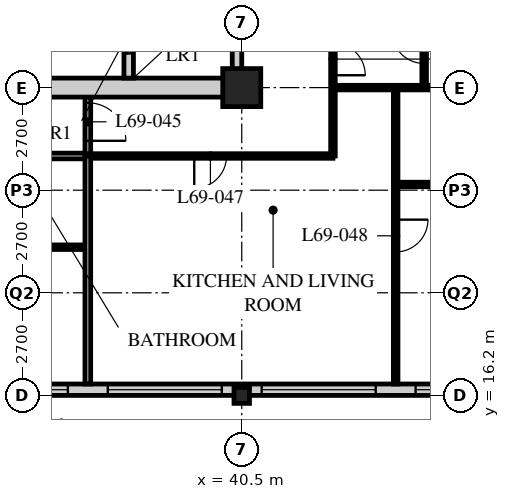
"""IFC4 building model, lengths in metres.
Left out: names, types, materials, properties, quantities, classifications, styles, units other than length and angle.
Written with IfcOpenShell. Run it as: python <this file> out.ifc"""

import sys

from ifc_helpers import new_model, si_unit, direction, frame, frame_2d, origin, origin_2d, place, context, subcontext, project, spatial, rectangle, hollow_rectangle, i_section, extrude, element, fill, save


model = new_model("IFC4")
c1 = context("Model", 3, precision=1e-05, world=origin(), true_north=direction((0.0, 1.0)))
c2 = subcontext(c1, "Body", "Model", "MODEL_VIEW")
j1 = project(units=[si_unit("LENGTHUNIT", "METRE"), si_unit("PLANEANGLEUNIT", "RADIAN")], contexts=[c1])
p1 = place(None, origin())
s1 = spatial("IfcSite", under=j1, at=p1, CompositionType="ELEMENT")
p2 = place(p1, origin())
s2 = spatial("IfcBuilding", under=s1, at=p2, CompositionType="ELEMENT")
p3 = place(p2, frame((0.0, 0.0, 269.7)))
s3 = spatial("IfcBuildingStorey", under=s2, at=p3, CompositionType="ELEMENT", Elevation=269.7)
p4 = place(p3, frame((40.5, 16.2, 0.0), z_axis=(0.0, 0.0, 1.0), x_axis=(1.0, 0.0, 0.0)))
e1 = element("IfcColumn", 1, at=p4, inside=s3, PredefinedType="COLUMN", context=c2, shape_type="SweptSolid", body=[
    extrude(i_section(OverallWidth=0.407, OverallDepth=0.419, WebThickness=0.031, FlangeThickness=0.049, FilletRadius=0.015, at=origin_2d()), origin(), (0.0, 0.0, 1.0), 3.9),
])
p5 = place(p3, frame((40.5, 24.3, 0.0), z_axis=(0.0, 0.0, 1.0), x_axis=(1.0, 0.0, 0.0)))
e2 = element("IfcColumn", 2, at=p5, inside=s3, PredefinedType="COLUMN", context=c2, shape_type="SweptSolid", body=[
    extrude(hollow_rectangle(XDim=1.0, YDim=1.0, WallThickness=0.1, at=origin_2d()), origin(), (0.0, 0.0, 1.0), 3.9),
])
p6 = place(p3, frame((8.4, 16.35, 0.0), z_axis=(0.0, 0.0, 1.0), x_axis=(1.0, 0.0, 0.0)))
e3 = element("IfcWall", 3, at=p6, inside=s3, PredefinedType="SOLIDWALL", context=c2, shape_type="SweptSolid", body=[
    extrude(rectangle(XDim=40.2, YDim=0.3, at=frame_2d((20.1, 0.0))), origin(), (0.0, 0.0, 1.0), 3.69),
])
p7 = place(p6, frame((0.225, 0.0, 0.6)))
e4 = element("IfcOpeningElement", 4, at=p7, cuts=e3, PredefinedType="OPENING", context=c2, shape_type="SweptSolid", body=[
    extrude(rectangle(XDim=3.0, YDim=2.4, at=frame_2d((1.5, 1.2))), frame((0.0, 0.16, 0.0), z_axis=(0.0, -1.0, 0.0), x_axis=(1.0, 0.0, 0.0)), (0.0, 0.0, 1.0), 0.32),
])
p8 = place(p6, frame((4.275, 0.0, 0.6)))
e5 = element("IfcOpeningElement", 5, at=p8, cuts=e3, PredefinedType="OPENING", context=c2, shape_type="SweptSolid", body=[
    extrude(rectangle(XDim=3.0, YDim=2.4, at=frame_2d((1.5, 1.2))), frame((0.0, 0.16, 0.0), z_axis=(0.0, -1.0, 0.0), x_axis=(1.0, 0.0, 0.0)), (0.0, 0.0, 1.0), 0.32),
])
p9 = place(p6, frame((8.325, 0.0, 0.6)))
e6 = element("IfcOpeningElement", 6, at=p9, cuts=e3, PredefinedType="OPENING", context=c2, shape_type="SweptSolid", body=[
    extrude(rectangle(XDim=3.0, YDim=2.4, at=frame_2d((1.5, 1.2))), frame((0.0, 0.16, 0.0), z_axis=(0.0, -1.0, 0.0), x_axis=(1.0, 0.0, 0.0)), (0.0, 0.0, 1.0), 0.32),
])
p10 = place(p6, frame((12.375, 0.0, 0.6)))
e7 = element("IfcOpeningElement", 7, at=p10, cuts=e3, PredefinedType="OPENING", context=c2, shape_type="SweptSolid", body=[
    extrude(rectangle(XDim=3.0, YDim=2.4, at=frame_2d((1.5, 1.2))), frame((0.0, 0.16, 0.0), z_axis=(0.0, -1.0, 0.0), x_axis=(1.0, 0.0, 0.0)), (0.0, 0.0, 1.0), 0.32),
])
p11 = place(p6, frame((16.425, 0.0, 0.6)))
e8 = element("IfcOpeningElement", 8, at=p11, cuts=e3, PredefinedType="OPENING", context=c2, shape_type="SweptSolid", body=[
    extrude(rectangle(XDim=3.0, YDim=2.4, at=frame_2d((1.5, 1.2))), frame((0.0, 0.16, 0.0), z_axis=(0.0, -1.0, 0.0), x_axis=(1.0, 0.0, 0.0)), (0.0, 0.0, 1.0), 0.32),
])
p12 = place(p6, frame((20.475, 0.0, 0.6)))
e9 = element("IfcOpeningElement", 9, at=p12, cuts=e3, PredefinedType="OPENING", context=c2, shape_type="SweptSolid", body=[
    extrude(rectangle(XDim=3.0, YDim=2.4, at=frame_2d((1.5, 1.2))), frame((0.0, 0.16, 0.0), z_axis=(0.0, -1.0, 0.0), x_axis=(1.0, 0.0, 0.0)), (0.0, 0.0, 1.0), 0.32),
])
p13 = place(p6, frame((24.525, 0.0, 0.6)))
e10 = element("IfcOpeningElement", 10, at=p13, cuts=e3, PredefinedType="OPENING", context=c2, shape_type="SweptSolid", body=[
    extrude(rectangle(XDim=3.0, YDim=2.4, at=frame_2d((1.5, 1.2))), frame((0.0, 0.16, 0.0), z_axis=(0.0, -1.0, 0.0), x_axis=(1.0, 0.0, 0.0)), (0.0, 0.0, 1.0), 0.32),
])
p14 = place(p6, frame((28.575, 0.0, 0.6)))
e11 = element("IfcOpeningElement", 11, at=p14, cuts=e3, PredefinedType="OPENING", context=c2, shape_type="SweptSolid", body=[
    extrude(rectangle(XDim=3.0, YDim=2.4, at=frame_2d((1.5, 1.2))), frame((0.0, 0.16, 0.0), z_axis=(0.0, -1.0, 0.0), x_axis=(1.0, 0.0, 0.0)), (0.0, 0.0, 1.0), 0.32),
])
p15 = place(p6, frame((32.625, 0.0, 0.6)))
e12 = element("IfcOpeningElement", 12, at=p15, cuts=e3, PredefinedType="OPENING", context=c2, shape_type="SweptSolid", body=[
    extrude(rectangle(XDim=3.0, YDim=2.4, at=frame_2d((1.5, 1.2))), frame((0.0, 0.16, 0.0), z_axis=(0.0, -1.0, 0.0), x_axis=(1.0, 0.0, 0.0)), (0.0, 0.0, 1.0), 0.32),
])
p16 = place(p6, frame((36.675, 0.0, 0.6)))
e13 = element("IfcOpeningElement", 13, at=p16, cuts=e3, PredefinedType="OPENING", context=c2, shape_type="SweptSolid", body=[
    extrude(rectangle(XDim=3.0, YDim=2.4, at=frame_2d((1.5, 1.2))), frame((0.0, 0.16, 0.0), z_axis=(0.0, -1.0, 0.0), x_axis=(1.0, 0.0, 0.0)), (0.0, 0.0, 1.0), 0.32),
])
p17 = place(p3, frame((12.15, 22.5, 0.0), z_axis=(0.0, 0.0, 1.0), x_axis=(1.0, 0.0, 0.0)))
e14 = element("IfcWall", 14, at=p17, inside=s3, PredefinedType="PARTITIONING", context=c2, shape_type="SweptSolid", body=[
    extrude(rectangle(XDim=24.3, YDim=0.15, at=frame_2d((12.15, 0.0))), origin(), (0.0, 0.0, 1.0), 3.69),
])
p18 = place(p17, frame((4.45, 0.0, 0.0)))
e15 = element("IfcOpeningElement", 15, at=p18, cuts=e14, PredefinedType="OPENING", context=c2, shape_type="SweptSolid", body=[
    extrude(rectangle(XDim=1.0, YDim=2.1, at=frame_2d((0.5, 1.05))), frame((0.0, 0.085, 0.0), z_axis=(0.0, -1.0, 0.0), x_axis=(1.0, 0.0, 0.0)), (0.0, 0.0, 1.0), 0.17),
])
p19 = place(p17, frame((12.55, 0.0, 0.0)))
e16 = element("IfcOpeningElement", 16, at=p19, cuts=e14, PredefinedType="OPENING", context=c2, shape_type="SweptSolid", body=[
    extrude(rectangle(XDim=1.0, YDim=2.1, at=frame_2d((0.5, 1.05))), frame((0.0, 0.085, 0.0), z_axis=(0.0, -1.0, 0.0), x_axis=(1.0, 0.0, 0.0)), (0.0, 0.0, 1.0), 0.17),
])
p20 = place(p17, frame((2.625, 0.0, 0.0)))
e17 = element("IfcOpeningElement", 17, at=p20, cuts=e14, PredefinedType="OPENING", context=c2, shape_type="SweptSolid", body=[
    extrude(rectangle(XDim=1.0, YDim=2.1, at=frame_2d((0.5, 1.05))), frame((0.0, 0.085, 0.0), z_axis=(0.0, -1.0, 0.0), x_axis=(1.0, 0.0, 0.0)), (0.0, 0.0, 1.0), 0.17),
])
p21 = place(p3, frame((36.45, 22.5, 0.0), z_axis=(0.0, 0.0, 1.0), x_axis=(0.0, 1.0, 0.0)))
e18 = element("IfcWall", 18, at=p21, inside=s3, PredefinedType="PARTITIONING", context=c2, shape_type="SweptSolid", body=[
    extrude(rectangle(XDim=1.8, YDim=0.15, at=frame_2d((0.9, 0.0))), origin(), (0.0, 0.0, 1.0), 3.69),
])
p22 = place(p21, frame((0.4, 0.0, 0.0)))
e19 = element("IfcOpeningElement", 19, at=p22, cuts=e18, PredefinedType="OPENING", context=c2, shape_type="SweptSolid", body=[
    extrude(rectangle(XDim=1.0, YDim=2.1, at=frame_2d((0.5, 1.05))), frame((0.0, 0.085, 0.0), z_axis=(0.0, -1.0, 0.0), x_axis=(1.0, 0.0, 0.0)), (0.0, 0.0, 1.0), 0.17),
])
p23 = place(p3, frame((12.15, 20.1, 0.0), z_axis=(0.0, 0.0, 1.0), x_axis=(1.0, 0.0, 0.0)))
e20 = element("IfcWall", 20, at=p23, inside=s3, PredefinedType="PARTITIONING", context=c2, shape_type="SweptSolid", body=[
    extrude(rectangle(XDim=24.3, YDim=0.12, at=frame_2d((12.15, 0.0))), origin(), (0.0, 0.0, 1.0), 3.69),
])
p24 = place(p23, frame((5.025, 0.0, 0.0)))
e21 = element("IfcOpeningElement", 21, at=p24, cuts=e20, PredefinedType="OPENING", context=c2, shape_type="SweptSolid", body=[
    extrude(rectangle(XDim=0.85, YDim=2.1, at=frame_2d((0.425, 1.05))), frame((0.0, 0.07, 0.0), z_axis=(0.0, -1.0, 0.0), x_axis=(1.0, 0.0, 0.0)), (0.0, 0.0, 1.0), 0.14),
])
p25 = place(p23, frame((8.425, 0.0, 0.0)))
e22 = element("IfcOpeningElement", 22, at=p25, cuts=e20, PredefinedType="OPENING", context=c2, shape_type="SweptSolid", body=[
    extrude(rectangle(XDim=0.85, YDim=2.1, at=frame_2d((0.425, 1.05))), frame((0.0, 0.07, 0.0), z_axis=(0.0, -1.0, 0.0), x_axis=(1.0, 0.0, 0.0)), (0.0, 0.0, 1.0), 0.14),
])
p26 = place(p23, frame((13.125, 0.0, 0.0)))
e23 = element("IfcOpeningElement", 23, at=p26, cuts=e20, PredefinedType="OPENING", context=c2, shape_type="SweptSolid", body=[
    extrude(rectangle(XDim=0.85, YDim=2.1, at=frame_2d((0.425, 1.05))), frame((0.0, 0.07, 0.0), z_axis=(0.0, -1.0, 0.0), x_axis=(1.0, 0.0, 0.0)), (0.0, 0.0, 1.0), 0.14),
])
p27 = place(p23, frame((20.575, 0.0, 0.0)))
e24 = element("IfcOpeningElement", 24, at=p27, cuts=e20, PredefinedType="OPENING", context=c2, shape_type="SweptSolid", body=[
    extrude(rectangle(XDim=0.85, YDim=2.1, at=frame_2d((0.425, 1.05))), frame((0.0, 0.07, 0.0), z_axis=(0.0, -1.0, 0.0), x_axis=(1.0, 0.0, 0.0)), (0.0, 0.0, 1.0), 0.14),
])
p28 = place(p23, frame((2.725, 0.0, 0.0)))
e25 = element("IfcOpeningElement", 25, at=p28, cuts=e20, PredefinedType="OPENING", context=c2, shape_type="SweptSolid", body=[
    extrude(rectangle(XDim=0.85, YDim=2.1, at=frame_2d((0.425, 1.05))), frame((0.0, 0.07, 0.0), z_axis=(0.0, -1.0, 0.0), x_axis=(1.0, 0.0, 0.0)), (0.0, 0.0, 1.0), 0.14),
])
p29 = place(p3, frame((42.9, 22.5, 0.0), z_axis=(0.0, 0.0, 1.0), x_axis=(0.0, 1.0, 0.0)))
e26 = element("IfcWall", 26, at=p29, inside=s3, PredefinedType="PARTITIONING", context=c2, shape_type="SweptSolid", body=[
    extrude(rectangle(XDim=18.0, YDim=0.12, at=frame_2d((9.0, 0.0))), origin(), (0.0, 0.0, 1.0), 3.69),
])
p30 = place(p29, frame((2.125, 0.0, 0.0)))
e27 = element("IfcOpeningElement", 27, at=p30, cuts=e26, PredefinedType="OPENING", context=c2, shape_type="SweptSolid", body=[
    extrude(rectangle(XDim=0.85, YDim=2.1, at=frame_2d((0.425, 1.05))), frame((0.0, 0.07, 0.0), z_axis=(0.0, -1.0, 0.0), x_axis=(1.0, 0.0, 0.0)), (0.0, 0.0, 1.0), 0.14),
])
p31 = place(p29, frame((6.175, 0.0, 0.0)))
e28 = element("IfcOpeningElement", 28, at=p31, cuts=e26, PredefinedType="OPENING", context=c2, shape_type="SweptSolid", body=[
    extrude(rectangle(XDim=0.85, YDim=2.1, at=frame_2d((0.425, 1.05))), frame((0.0, 0.07, 0.0), z_axis=(0.0, -1.0, 0.0), x_axis=(1.0, 0.0, 0.0)), (0.0, 0.0, 1.0), 0.14),
])
p32 = place(p29, frame((10.225, 0.0, 0.0)))
e29 = element("IfcOpeningElement", 29, at=p32, cuts=e26, PredefinedType="OPENING", context=c2, shape_type="SweptSolid", body=[
    extrude(rectangle(XDim=0.85, YDim=2.1, at=frame_2d((0.425, 1.05))), frame((0.0, 0.07, 0.0), z_axis=(0.0, -1.0, 0.0), x_axis=(1.0, 0.0, 0.0)), (0.0, 0.0, 1.0), 0.14),
])
p33 = place(p29, frame((14.275, 0.0, 0.0)))
e30 = element("IfcOpeningElement", 30, at=p33, cuts=e26, PredefinedType="OPENING", context=c2, shape_type="SweptSolid", body=[
    extrude(rectangle(XDim=0.85, YDim=2.1, at=frame_2d((0.425, 1.05))), frame((0.0, 0.07, 0.0), z_axis=(0.0, -1.0, 0.0), x_axis=(1.0, 0.0, 0.0)), (0.0, 0.0, 1.0), 0.14),
])
p34 = place(p3, frame((36.45, 22.5, 0.0), z_axis=(0.0, 0.0, 1.0), x_axis=(1.0, 0.0, 0.0)))
e31 = element("IfcWall", 31, at=p34, inside=s3, PredefinedType="PARTITIONING", context=c2, shape_type="SweptSolid", body=[
    extrude(rectangle(XDim=6.45, YDim=0.12, at=frame_2d((3.225, 0.0))), origin(), (0.0, 0.0, 1.0), 3.69),
])
p35 = place(p34, frame((2.8, 0.0, 0.0)))
e32 = element("IfcOpeningElement", 32, at=p35, cuts=e31, PredefinedType="OPENING", context=c2, shape_type="SweptSolid", body=[
    extrude(rectangle(XDim=0.85, YDim=2.1, at=frame_2d((0.425, 1.05))), frame((0.0, 0.07, 0.0), z_axis=(0.0, -1.0, 0.0), x_axis=(1.0, 0.0, 0.0)), (0.0, 0.0, 1.0), 0.14),
])
p36 = place(p3, frame((42.9, 24.3, 0.0), z_axis=(0.0, 0.0, 1.0), x_axis=(1.0, 0.0, 0.0)))
e33 = element("IfcWall", 33, at=p36, inside=s3, PredefinedType="PARTITIONING", context=c2, shape_type="SweptSolid", body=[
    extrude(rectangle(XDim=9.45, YDim=0.12, at=frame_2d((4.725, 0.0))), origin(), (0.0, 0.0, 1.0), 3.078),
])
p37 = place(p3, frame((36.45, 16.5, 0.0), z_axis=(0.0, 0.0, 1.0), x_axis=(0.0, 1.0, 0.0)))
e34 = element("IfcWall", 34, at=p37, inside=s3, PredefinedType="PARTITIONING", context=c2, shape_type="SweptSolid", body=[
    extrude(rectangle(XDim=6.0, YDim=0.15, at=frame_2d((3.0, 0.0))), origin(), (0.0, 0.0, 1.0), 3.69),
])
p38 = place(p3, frame((44.55, 16.5, 0.0), z_axis=(0.0, 0.0, 1.0), x_axis=(0.0, 1.0, 0.0)))
e35 = element("IfcWall", 35, at=p38, inside=s3, PredefinedType="PARTITIONING", context=c2, shape_type="SweptSolid", body=[
    extrude(rectangle(XDim=7.8, YDim=0.12, at=frame_2d((3.9, 0.0))), origin(), (0.0, 0.0, 1.0), 3.69),
])
p39 = place(p38, frame((3.475, 0.0, 0.0)))
e36 = element("IfcOpeningElement", 36, at=p39, cuts=e35, PredefinedType="OPENING", context=c2, shape_type="SweptSolid", body=[
    extrude(rectangle(XDim=0.85, YDim=2.1, at=frame_2d((0.425, 1.05))), frame((0.0, 0.07, 0.0), z_axis=(0.0, -1.0, 0.0), x_axis=(1.0, 0.0, 0.0)), (0.0, 0.0, 1.0), 0.14),
])
p40 = place(p3, frame((45.3, 24.3, 0.0), z_axis=(0.0, 0.0, 1.0), x_axis=(0.0, 1.0, 0.0)))
e37 = element("IfcWall", 37, at=p40, inside=s3, PredefinedType="PARTITIONING", context=c2, shape_type="SweptSolid", body=[
    extrude(rectangle(XDim=1.76, YDim=0.12, at=frame_2d((0.88, 0.0))), origin(), (0.0, 0.0, 1.0), 3.69),
])
p41 = place(p40, frame((0.635, 0.0, 0.0)))
e38 = element("IfcOpeningElement", 38, at=p41, cuts=e37, PredefinedType="OPENING", context=c2, shape_type="SweptSolid", body=[
    extrude(rectangle(XDim=0.85, YDim=2.1, at=frame_2d((0.425, 1.05))), frame((0.0, 0.07, 0.0), z_axis=(0.0, -1.0, 0.0), x_axis=(1.0, 0.0, 0.0)), (0.0, 0.0, 1.0), 0.14),
])
p42 = place(p3, frame((44.55, 21.75, 0.0), z_axis=(0.0, 0.0, 1.0), x_axis=(1.0, 0.0, 0.0)))
e39 = element("IfcWall", 39, at=p42, inside=s3, PredefinedType="PARTITIONING", context=c2, shape_type="SweptSolid", body=[
    extrude(rectangle(XDim=7.8, YDim=0.12, at=frame_2d((3.9, 0.0))), origin(), (0.0, 0.0, 1.0), 3.69),
])
p43 = place(p42, frame((3.475, 0.0, 0.0)))
e40 = element("IfcOpeningElement", 40, at=p43, cuts=e39, PredefinedType="OPENING", context=c2, shape_type="SweptSolid", body=[
    extrude(rectangle(XDim=0.85, YDim=2.1, at=frame_2d((0.425, 1.05))), frame((0.0, 0.07, 0.0), z_axis=(0.0, -1.0, 0.0), x_axis=(1.0, 0.0, 0.0)), (0.0, 0.0, 1.0), 0.14),
])
p44 = place(p3, frame((15.95, 24.3, 0.0), z_axis=(0.0, 0.0, 1.0), x_axis=(1.0, 0.0, 0.0)))
e41 = element("IfcWall", 41, at=p44, inside=s3, PredefinedType="SOLIDWALL", context=c2, shape_type="SweptSolid", body=[
    extrude(rectangle(XDim=24.55, YDim=0.5, at=frame_2d((12.275, 0.0))), origin(), (0.0, 0.0, 1.0), 3.04),
])
p45 = place(p44, frame((11.5, 0.0, 0.0)))
e42 = element("IfcOpeningElement", 42, at=p45, cuts=e41, PredefinedType="OPENING", context=c2, shape_type="SweptSolid", body=[
    extrude(rectangle(XDim=1.8, YDim=2.4, at=frame_2d((0.9, 1.2))), frame((0.0, 0.26, 0.0), z_axis=(0.0, -1.0, 0.0), x_axis=(1.0, 0.0, 0.0)), (0.0, 0.0, 1.0), 0.52),
])
p46 = place(p3, frame((40.375, 24.55, 0.0), z_axis=(0.0, 0.0, 1.0), x_axis=(0.0, 1.0, 0.0)))
e43 = element("IfcWall", 43, at=p46, inside=s3, PredefinedType="SOLIDWALL", context=c2, shape_type="SweptSolid", body=[
    extrude(rectangle(XDim=15.7, YDim=0.25, at=frame_2d((7.85, 0.0))), origin(), (0.0, 0.0, 1.0), 3.078),
])
p47 = place(p3, frame((37.525, 24.55, 0.0), z_axis=(0.0, 0.0, 1.0), x_axis=(0.0, 1.0, 0.0)))
e44 = element("IfcWall", 44, at=p47, inside=s3, PredefinedType="SOLIDWALL", context=c2, shape_type="SweptSolid", body=[
    extrude(rectangle(XDim=7.75, YDim=0.25, at=frame_2d((3.875, 0.0))), origin(), (0.0, 0.0, 1.0), 3.69),
])
p48 = place(p47, frame((0.65, 0.0, 0.0)))
e45 = element("IfcOpeningElement", 45, at=p48, cuts=e44, PredefinedType="OPENING", context=c2, shape_type="SweptSolid", body=[
    extrude(rectangle(XDim=1.1, YDim=2.4, at=frame_2d((0.55, 1.2))), frame((0.0, 0.135, 0.0), z_axis=(0.0, -1.0, 0.0), x_axis=(1.0, 0.0, 0.0)), (0.0, 0.0, 1.0), 0.27),
])
p49 = place(p47, frame((3.25, 0.0, 0.0)))
e46 = element("IfcOpeningElement", 46, at=p49, cuts=e44, PredefinedType="OPENING", context=c2, shape_type="SweptSolid", body=[
    extrude(rectangle(XDim=1.1, YDim=2.4, at=frame_2d((0.55, 1.2))), frame((0.0, 0.135, 0.0), z_axis=(0.0, -1.0, 0.0), x_axis=(1.0, 0.0, 0.0)), (0.0, 0.0, 1.0), 0.27),
])
p50 = place(p47, frame((5.85, 0.0, 0.0)))
e47 = element("IfcOpeningElement", 47, at=p50, cuts=e44, PredefinedType="OPENING", context=c2, shape_type="SweptSolid", body=[
    extrude(rectangle(XDim=1.1, YDim=2.4, at=frame_2d((0.55, 1.2))), frame((0.0, 0.135, 0.0), z_axis=(0.0, -1.0, 0.0), x_axis=(1.0, 0.0, 0.0)), (0.0, 0.0, 1.0), 0.27),
])
p51 = place(p13, origin())
e48 = element("IfcWindow", 48, at=p51, inside=s3, PartitioningType="SINGLE_PANEL", PredefinedType="WINDOW", context=c2, shape_type="SweptSolid", body=[
    extrude(rectangle(XDim=3.0, YDim=2.4, at=frame_2d((1.5, 1.2))), frame((0.0, 0.03, 0.0), z_axis=(0.0, -1.0, 0.0), x_axis=(1.0, 0.0, 0.0)), (0.0, 0.0, 1.0), 0.06),
])
fill(e10, e48)
p52 = place(p14, origin())
e49 = element("IfcWindow", 49, at=p52, inside=s3, PartitioningType="SINGLE_PANEL", PredefinedType="WINDOW", context=c2, shape_type="SweptSolid", body=[
    extrude(rectangle(XDim=3.0, YDim=2.4, at=frame_2d((1.5, 1.2))), frame((0.0, 0.03, 0.0), z_axis=(0.0, -1.0, 0.0), x_axis=(1.0, 0.0, 0.0)), (0.0, 0.0, 1.0), 0.06),
])
fill(e11, e49)
p53 = place(p15, origin())
e50 = element("IfcWindow", 50, at=p53, inside=s3, PartitioningType="SINGLE_PANEL", PredefinedType="WINDOW", context=c2, shape_type="SweptSolid", body=[
    extrude(rectangle(XDim=3.0, YDim=2.4, at=frame_2d((1.5, 1.2))), frame((0.0, 0.03, 0.0), z_axis=(0.0, -1.0, 0.0), x_axis=(1.0, 0.0, 0.0)), (0.0, 0.0, 1.0), 0.06),
])
fill(e12, e50)
p54 = place(p16, origin())
e51 = element("IfcWindow", 51, at=p54, inside=s3, PartitioningType="SINGLE_PANEL", PredefinedType="WINDOW", context=c2, shape_type="SweptSolid", body=[
    extrude(rectangle(XDim=3.0, YDim=2.4, at=frame_2d((1.5, 1.2))), frame((0.0, 0.03, 0.0), z_axis=(0.0, -1.0, 0.0), x_axis=(1.0, 0.0, 0.0)), (0.0, 0.0, 1.0), 0.06),
])
fill(e13, e51)
p55 = place(p22, origin())
e52 = element("IfcDoor", 52, at=p55, inside=s3, OperationType="SINGLE_SWING_RIGHT", PredefinedType="DOOR", context=c2, shape_type="SweptSolid", body=[
    extrude(rectangle(XDim=1.0, YDim=2.1, at=frame_2d((0.5, 1.05))), frame((0.0, 0.025, 0.0), z_axis=(0.0, -1.0, 0.0), x_axis=(1.0, 0.0, 0.0)), (0.0, 0.0, 1.0), 0.05),
])
fill(e19, e52)
p56 = place(p35, origin())
e53 = element("IfcDoor", 53, at=p56, inside=s3, OperationType="SINGLE_SWING_RIGHT", PredefinedType="DOOR", context=c2, shape_type="SweptSolid", body=[
    extrude(rectangle(XDim=0.85, YDim=2.1, at=frame_2d((0.425, 1.05))), frame((0.0, 0.025, 0.0), z_axis=(0.0, -1.0, 0.0), x_axis=(1.0, 0.0, 0.0)), (0.0, 0.0, 1.0), 0.05),
])
fill(e32, e53)
p57 = place(p39, origin())
e54 = element("IfcDoor", 54, at=p57, inside=s3, OperationType="SINGLE_SWING_LEFT", PredefinedType="DOOR", context=c2, shape_type="SweptSolid", body=[
    extrude(rectangle(XDim=0.85, YDim=2.1, at=frame_2d((0.425, 1.05))), frame((0.0, 0.025, 0.0), z_axis=(0.0, -1.0, 0.0), x_axis=(1.0, 0.0, 0.0)), (0.0, 0.0, 1.0), 0.05),
])
fill(e36, e54)
p58 = place(p30, origin())
e55 = element("IfcDoor", 55, at=p58, inside=s3, OperationType="SINGLE_SWING_RIGHT", PredefinedType="DOOR", context=c2, shape_type="SweptSolid", body=[
    extrude(rectangle(XDim=0.85, YDim=2.1, at=frame_2d((0.425, 1.05))), frame((0.0, 0.025, 0.0), z_axis=(0.0, -1.0, 0.0), x_axis=(1.0, 0.0, 0.0)), (0.0, 0.0, 1.0), 0.05),
])
fill(e27, e55)
p59 = place(p41, origin())
e56 = element("IfcDoor", 56, at=p59, inside=s3, OperationType="SINGLE_SWING_RIGHT", PredefinedType="DOOR", context=c2, shape_type="SweptSolid", body=[
    extrude(rectangle(XDim=0.85, YDim=2.1, at=frame_2d((0.425, 1.05))), frame((0.0, 0.025, 0.0), z_axis=(0.0, -1.0, 0.0), x_axis=(1.0, 0.0, 0.0)), (0.0, 0.0, 1.0), 0.05),
])
fill(e38, e56)
p60 = place(p48, origin())
e57 = element("IfcDoor", 57, at=p60, inside=s3, OperationType="DOUBLE_DOOR_SLIDING", PredefinedType="DOOR", context=c2, shape_type="SweptSolid", body=[
    extrude(rectangle(XDim=1.1, YDim=2.4, at=frame_2d((0.55, 1.2))), frame((0.0, 0.025, 0.0), z_axis=(0.0, -1.0, 0.0), x_axis=(1.0, 0.0, 0.0)), (0.0, 0.0, 1.0), 0.05),
])
fill(e45, e57)
save(model, sys.argv[1])
